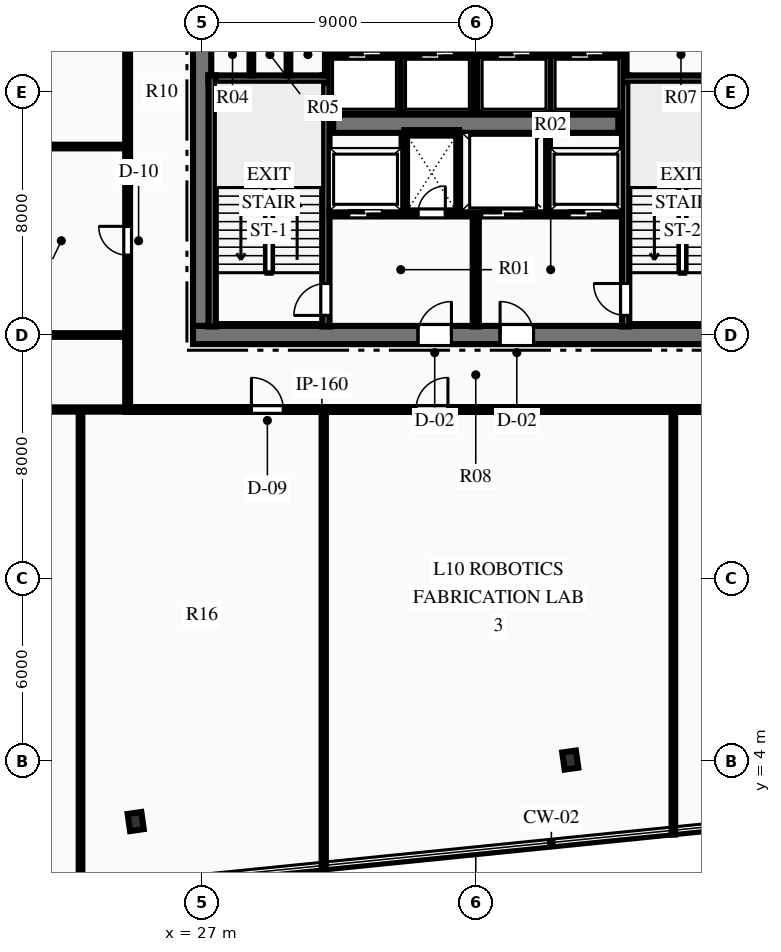
"""IFC4 building model, lengths in metres.
Left out: names, types, materials, properties, quantities, classifications, styles, units other than length and angle.
Written with IfcOpenShell. Run it as: python <this file> out.ifc"""

import sys

from ifc_helpers import new_model, si_unit, direction, frame, frame_2d, origin, origin_2d, place, context, subcontext, project, spatial, rectangle, i_section, extrude, element, fill, save


model = new_model("IFC4")
c1 = context("Model", 3, precision=1e-05, world=origin(), true_north=direction((0.0, 1.0)))
c2 = subcontext(c1, "Body", "Model", "MODEL_VIEW")
j1 = project(units=[si_unit("LENGTHUNIT", "METRE"), si_unit("PLANEANGLEUNIT", "RADIAN")], contexts=[c1])
p1 = place(None, origin())
s1 = spatial("IfcSite", under=j1, at=p1, CompositionType="ELEMENT")
p2 = place(p1, origin())
s2 = spatial("IfcBuilding", under=s1, at=p2, CompositionType="ELEMENT")
p3 = place(p2, frame((0.0, 0.0, 47.7)))
s3 = spatial("IfcBuildingStorey", under=s2, at=p3, CompositionType="ELEMENT", Elevation=47.7)
p4 = place(p3, frame((26.7, 18.0, 0.0), z_axis=(0.0, 0.0, 1.0), x_axis=(1.0, 0.0, 0.0)))
e1 = element("IfcWall", 1, at=p4, inside=s3, PredefinedType="SHEAR", context=c2, shape_type="SweptSolid", body=[
    extrude(rectangle(XDim=18.6, YDim=0.6, at=frame_2d((9.3, 0.0))), origin(), (0.0, 0.0, 1.0), 3.75),
])
p5 = place(p4, frame((7.4, 0.0, 0.0)))
e2 = element("IfcOpeningElement", 2, at=p5, cuts=e1, PredefinedType="OPENING", context=c2, shape_type="SweptSolid", body=[
    extrude(rectangle(XDim=1.1, YDim=2.15, at=frame_2d((0.55, 1.075))), frame((0.0, 0.31, 0.0), z_axis=(0.0, -1.0, 0.0), x_axis=(1.0, 0.0, 0.0)), (0.0, 0.0, 1.0), 0.62),
])
p6 = place(p4, frame((10.1, 0.0, 0.0)))
e3 = element("IfcOpeningElement", 3, at=p6, cuts=e1, PredefinedType="OPENING", context=c2, shape_type="SweptSolid", body=[
    extrude(rectangle(XDim=1.1, YDim=2.15, at=frame_2d((0.55, 1.075))), frame((0.0, 0.31, 0.0), z_axis=(0.0, -1.0, 0.0), x_axis=(1.0, 0.0, 0.0)), (0.0, 0.0, 1.0), 0.62),
])
p7 = place(p3, frame((27.0, 18.3, 0.0), z_axis=(0.0, 0.0, 1.0), x_axis=(0.0, 1.0, 0.0)))
e4 = element("IfcWall", 4, at=p7, inside=s3, PredefinedType="SHEAR", context=c2, shape_type="SweptSolid", body=[
    extrude(rectangle(XDim=15.4, YDim=0.6, at=frame_2d((7.7, 0.0))), origin(), (0.0, 0.0, 1.0), 3.75),
])
p8 = place(p7, frame((9.94, 0.0, 0.0)))
e5 = element("IfcOpeningElement", 5, at=p8, cuts=e4, PredefinedType="OPENING", context=c2, shape_type="SweptSolid", body=[
    extrude(rectangle(XDim=1.4, YDim=2.2, at=frame_2d((0.7, 1.1))), frame((0.0, 0.31, 0.0), z_axis=(0.0, -1.0, 0.0), x_axis=(1.0, 0.0, 0.0)), (0.0, 0.0, 1.0), 0.62),
])
p9 = place(p3, frame((31.31, 24.95, 0.0), z_axis=(0.0, 0.0, 1.0), x_axis=(1.0, 0.0, 0.0)))
e6 = element("IfcWall", 6, at=p9, inside=s3, PredefinedType="SHEAR", context=c2, shape_type="SweptSolid", body=[
    extrude(rectangle(XDim=9.38, YDim=0.6, at=frame_2d((4.69, 0.0))), origin(), (0.0, 0.0, 1.0), 3.75),
])
p10 = place(p3, frame((31.07, 18.28, 0.0), z_axis=(0.0, 0.0, 1.0), x_axis=(0.0, 1.0, 0.0)))
e7 = element("IfcWall", 7, at=p10, inside=s3, PredefinedType="SHEAR", context=c2, shape_type="SweptSolid", body=[
    extrude(rectangle(XDim=8.26, YDim=0.24, at=frame_2d((4.13, 0.0))), origin(), (0.0, 0.0, 1.0), 3.75),
])
p11 = place(p10, frame((0.365, 0.0, 0.0)))
e8 = element("IfcOpeningElement", 8, at=p11, cuts=e7, PredefinedType="OPENING", context=c2, shape_type="SweptSolid", body=[
    extrude(rectangle(XDim=1.05, YDim=2.15, at=frame_2d((0.525, 1.075))), frame((0.0, 0.13, 0.0), z_axis=(0.0, -1.0, 0.0), x_axis=(1.0, 0.0, 0.0)), (0.0, 0.0, 1.0), 0.26),
])
p12 = place(p3, frame((27.21, 26.42, 0.0), z_axis=(0.0, 0.0, 1.0), x_axis=(1.0, 0.0, 0.0)))
e9 = element("IfcWall", 9, at=p12, inside=s3, PredefinedType="SHEAR", context=c2, shape_type="SweptSolid", body=[
    extrude(rectangle(XDim=3.98, YDim=0.24, at=frame_2d((1.99, 0.0))), origin(), (0.0, 0.0, 1.0), 3.75),
])
p13 = place(p3, frame((27.33, 18.28, 0.0), z_axis=(0.0, 0.0, 1.0), x_axis=(0.0, 1.0, 0.0)))
e10 = element("IfcWall", 10, at=p13, inside=s3, PredefinedType="SHEAR", context=c2, shape_type="SweptSolid", body=[
    extrude(rectangle(XDim=8.26, YDim=0.24, at=frame_2d((4.13, 0.0))), origin(), (0.0, 0.0, 1.0), 3.75),
])
p14 = place(p3, frame((40.93, 18.28, 0.0), z_axis=(0.0, 0.0, 1.0), x_axis=(0.0, 1.0, 0.0)))
e11 = element("IfcWall", 11, at=p14, inside=s3, PredefinedType="SHEAR", context=c2, shape_type="SweptSolid", body=[
    extrude(rectangle(XDim=8.26, YDim=0.24, at=frame_2d((4.13, 0.0))), origin(), (0.0, 0.0, 1.0), 3.75),
])
p15 = place(p14, frame((0.365, 0.0, 0.0)))
e12 = element("IfcOpeningElement", 12, at=p15, cuts=e11, PredefinedType="OPENING", context=c2, shape_type="SweptSolid", body=[
    extrude(rectangle(XDim=1.05, YDim=2.15, at=frame_2d((0.525, 1.075))), frame((0.0, 0.13, 0.0), z_axis=(0.0, -1.0, 0.0), x_axis=(1.0, 0.0, 0.0)), (0.0, 0.0, 1.0), 0.26),
])
p16 = place(p3, frame((40.81, 26.42, 0.0), z_axis=(0.0, 0.0, 1.0), x_axis=(1.0, 0.0, 0.0)))
e13 = element("IfcWall", 13, at=p16, inside=s3, PredefinedType="SHEAR", context=c2, shape_type="SweptSolid", body=[
    extrude(rectangle(XDim=3.98, YDim=0.24, at=frame_2d((1.99, 0.0))), origin(), (0.0, 0.0, 1.0), 3.75),
])
for number, where, z_axis, x_axis in (
    (14, (24.815, 1.997, 0.0), (0.0, 0.0, 1.0), (0.99, 0.14, 0.0)),
    (15, (39.109, 4.019, 0.0), (0.0, 0.0, 1.0), (0.99, 0.14, 0.0)),
):
    element("IfcColumn", number, at=place(p3, frame(where, z_axis=z_axis, x_axis=x_axis)), inside=s3, PredefinedType="COLUMN", context=c2, shape_type="SweptSolid", body=[
        extrude(i_section(OverallWidth=0.454, OverallDepth=0.569, WebThickness=0.078, FlangeThickness=0.125, at=origin_2d()), origin(), (0.0, 0.0, 1.0), 3.75),
    ])
p17 = place(p3, frame((36.0, 18.28, 0.0), z_axis=(0.0, 0.0, 1.0), x_axis=(0.0, 1.0, 0.0)))
e16 = element("IfcWall", 16, at=p17, inside=s3, PredefinedType="PARTITIONING", context=c2, shape_type="SweptSolid", body=[
    extrude(rectangle(XDim=3.77, YDim=0.2, at=frame_2d((1.885, 0.0))), origin(), (0.0, 0.0, 1.0), 3.44),
])
p18 = place(p3, frame((31.19, 22.0, 0.0), z_axis=(0.0, 0.0, 1.0), x_axis=(1.0, 0.0, 0.0)))
e17 = element("IfcWall", 17, at=p18, inside=s3, PredefinedType="PARTITIONING", context=c2, shape_type="SweptSolid", body=[
    extrude(rectangle(XDim=4.69, YDim=0.2, at=frame_2d((2.345, 0.0))), origin(), (0.0, 0.0, 1.0), 3.44),
])
p19 = place(p18, frame((2.91, 0.0, 0.0)))
e18 = element("IfcOpeningElement", 18, at=p19, cuts=e17, PredefinedType="OPENING", context=c2, shape_type="SweptSolid", body=[
    extrude(rectangle(XDim=0.9, YDim=2.15, at=frame_2d((0.45, 1.075))), frame((0.0, 0.11, 0.0), z_axis=(0.0, -1.0, 0.0), x_axis=(1.0, 0.0, 0.0)), (0.0, 0.0, 1.0), 0.22),
])
p20 = place(p18, frame((0.635, 0.0, 0.0)))
e19 = element("IfcOpeningElement", 19, at=p20, cuts=e17, PredefinedType="OPENING", context=c2, shape_type="SweptSolid", body=[
    extrude(rectangle(XDim=1.1, YDim=2.15, at=frame_2d((0.55, 1.075))), frame((0.0, 0.11, 0.0), z_axis=(0.0, -1.0, 0.0), x_axis=(1.0, 0.0, 0.0)), (0.0, 0.0, 1.0), 0.22),
])
p21 = place(p3, frame((36.12, 22.0, 0.0), z_axis=(0.0, 0.0, 1.0), x_axis=(1.0, 0.0, 0.0)))
e20 = element("IfcWall", 20, at=p21, inside=s3, PredefinedType="PARTITIONING", context=c2, shape_type="SweptSolid", body=[
    extrude(rectangle(XDim=4.69, YDim=0.2, at=frame_2d((2.345, 0.0))), origin(), (0.0, 0.0, 1.0), 3.44),
])
p22 = place(p21, frame((2.955, 0.0, 0.0)))
e21 = element("IfcOpeningElement", 21, at=p22, cuts=e20, PredefinedType="OPENING", context=c2, shape_type="SweptSolid", body=[
    extrude(rectangle(XDim=1.1, YDim=2.15, at=frame_2d((0.55, 1.075))), frame((0.0, 0.11, 0.0), z_axis=(0.0, -1.0, 0.0), x_axis=(1.0, 0.0, 0.0)), (0.0, 0.0, 1.0), 0.22),
])
p23 = place(p21, frame((0.08, 0.0, 0.0)))
e22 = element("IfcOpeningElement", 22, at=p23, cuts=e20, PredefinedType="OPENING", context=c2, shape_type="SweptSolid", body=[
    extrude(rectangle(XDim=1.4, YDim=2.2, at=frame_2d((0.7, 1.1))), frame((0.0, 0.11, 0.0), z_axis=(0.0, -1.0, 0.0), x_axis=(1.0, 0.0, 0.0)), (0.0, 0.0, 1.0), 0.22),
])
for number, where, z_axis, x_axis in (
    (23, (33.65, 22.05, 0.0), (0.0, 0.0, 1.0), (0.0, 1.0, 0.0)),
    (24, (35.45, 22.05, 0.0), (0.0, 0.0, 1.0), (0.0, 1.0, 0.0)),
):
    element("IfcWall", number, at=place(p3, frame(where, z_axis=z_axis, x_axis=x_axis)), inside=s3, PredefinedType="PARTITIONING", context=c2, shape_type="SweptSolid", body=[
        extrude(rectangle(XDim=2.6, YDim=0.18, at=frame_2d((1.3, 0.0))), origin(), (0.0, 0.0, 1.0), 3.44),
    ])
p24 = place(p3, frame((33.65, 24.65, 0.0), z_axis=(0.0, 0.0, 1.0), x_axis=(1.0, 0.0, 0.0)))
e25 = element("IfcWall", 25, at=p24, inside=s3, PredefinedType="PARTITIONING", context=c2, shape_type="SweptSolid", body=[
    extrude(rectangle(XDim=1.8, YDim=0.18, at=frame_2d((0.9, 0.0))), origin(), (0.0, 0.0, 1.0), 3.44),
])
p25 = place(p3, frame((38.35, 22.05, 0.0), z_axis=(0.0, 0.0, 1.0), x_axis=(0.0, 1.0, 0.0)))
e26 = element("IfcWall", 26, at=p25, inside=s3, PredefinedType="PARTITIONING", context=c2, shape_type="SweptSolid", body=[
    extrude(rectangle(XDim=2.6, YDim=0.18, at=frame_2d((1.3, 0.0))), origin(), (0.0, 0.0, 1.0), 3.44),
])
for number, where, z_axis, x_axis in (
    (27, (31.12, 26.54, 0.0), (0.0, 0.0, 1.0), (0.0, 1.0, 0.0)),
    (28, (40.88, 26.54, 0.0), (0.0, 0.0, 1.0), (0.0, 1.0, 0.0)),
):
    element("IfcWall", number, at=place(p3, frame(where, z_axis=z_axis, x_axis=x_axis)), inside=s3, PredefinedType="PARTITIONING", context=c2, shape_type="SweptSolid", body=[
        extrude(rectangle(XDim=1.51, YDim=0.16, at=frame_2d((0.755, 0.0))), origin(), (0.0, 0.0, 1.0), 3.44),
    ])
for number, where, z_axis, x_axis in (
    (29, (28.62, 26.54, 0.0), (0.0, 0.0, 1.0), (0.0, 1.0, 0.0)),
    (30, (29.84, 26.54, 0.0), (0.0, 0.0, 1.0), (0.0, 1.0, 0.0)),
):
    element("IfcWall", number, at=place(p3, frame(where, z_axis=z_axis, x_axis=x_axis)), inside=s3, PredefinedType="PARTITIONING", context=c2, shape_type="SweptSolid", body=[
        extrude(rectangle(XDim=1.44, YDim=0.12, at=frame_2d((0.72, 0.0))), origin(), (0.0, 0.0, 1.0), 3.44),
    ])
p26 = place(p3, frame((31.2, 27.2, 0.0), z_axis=(0.0, 0.0, 1.0), x_axis=(1.0, 0.0, 0.0)))
e31 = element("IfcWall", 31, at=p26, inside=s3, PredefinedType="PARTITIONING", context=c2, shape_type="SweptSolid", body=[
    extrude(rectangle(XDim=9.6, YDim=0.18, at=frame_2d((4.8, 0.0))), origin(), (0.0, 0.0, 1.0), 3.44),
])
p27 = place(p26, frame((0.59, 0.0, 0.0)))
e32 = element("IfcOpeningElement", 32, at=p27, cuts=e31, PredefinedType="OPENING", context=c2, shape_type="SweptSolid", body=[
    extrude(rectangle(XDim=1.1, YDim=2.15, at=frame_2d((0.55, 1.075))), frame((0.0, 0.1, 0.0), z_axis=(0.0, -1.0, 0.0), x_axis=(1.0, 0.0, 0.0)), (0.0, 0.0, 1.0), 0.2),
])
p28 = place(p26, frame((2.99, 0.0, 0.0)))
e33 = element("IfcOpeningElement", 33, at=p28, cuts=e31, PredefinedType="OPENING", context=c2, shape_type="SweptSolid", body=[
    extrude(rectangle(XDim=1.1, YDim=2.15, at=frame_2d((0.55, 1.075))), frame((0.0, 0.1, 0.0), z_axis=(0.0, -1.0, 0.0), x_axis=(1.0, 0.0, 0.0)), (0.0, 0.0, 1.0), 0.2),
])
p29 = place(p26, frame((5.51, 0.0, 0.0)))
e34 = element("IfcOpeningElement", 34, at=p29, cuts=e31, PredefinedType="OPENING", context=c2, shape_type="SweptSolid", body=[
    extrude(rectangle(XDim=1.1, YDim=2.15, at=frame_2d((0.55, 1.075))), frame((0.0, 0.1, 0.0), z_axis=(0.0, -1.0, 0.0), x_axis=(1.0, 0.0, 0.0)), (0.0, 0.0, 1.0), 0.2),
])
p30 = place(p26, frame((7.91, 0.0, 0.0)))
e35 = element("IfcOpeningElement", 35, at=p30, cuts=e31, PredefinedType="OPENING", context=c2, shape_type="SweptSolid", body=[
    extrude(rectangle(XDim=1.1, YDim=2.15, at=frame_2d((0.55, 1.075))), frame((0.0, 0.1, 0.0), z_axis=(0.0, -1.0, 0.0), x_axis=(1.0, 0.0, 0.0)), (0.0, 0.0, 1.0), 0.2),
])
for number, where, z_axis, x_axis in (
    (36, (33.54, 25.3, 0.0), (0.0, 0.0, 1.0), (0.0, 1.0, 0.0)),
    (37, (36.0, 25.3, 0.0), (0.0, 0.0, 1.0), (0.0, 1.0, 0.0)),
    (38, (38.46, 25.3, 0.0), (0.0, 0.0, 1.0), (0.0, 1.0, 0.0)),
):
    element("IfcWall", number, at=place(p3, frame(where, z_axis=z_axis, x_axis=x_axis)), inside=s3, PredefinedType="PARTITIONING", context=c2, shape_type="SweptSolid", body=[
        extrude(rectangle(XDim=1.9, YDim=0.18, at=frame_2d((0.95, 0.0))), origin(), (0.0, 0.0, 1.0), 3.44),
    ])
p31 = place(p3, frame((24.5, 15.55, 0.0), z_axis=(0.0, 0.0, 1.0), x_axis=(1.0, 0.0, 0.0)))
e39 = element("IfcWall", 39, at=p31, inside=s3, PredefinedType="PARTITIONING", context=c2, shape_type="SweptSolid", body=[
    extrude(rectangle(XDim=23.0, YDim=0.16, at=frame_2d((11.5, 0.0))), origin(), (0.0, 0.0, 1.0), 3.44),
])
p32 = place(p31, frame((4.121, 0.0, 0.0)))
e40 = element("IfcOpeningElement", 40, at=p32, cuts=e39, PredefinedType="OPENING", context=c2, shape_type="SweptSolid", body=[
    extrude(rectangle(XDim=1.05, YDim=2.15, at=frame_2d((0.525, 1.075))), frame((0.0, 0.09, 0.0), z_axis=(0.0, -1.0, 0.0), x_axis=(1.0, 0.0, 0.0)), (0.0, 0.0, 1.0), 0.18),
])
p33 = place(p31, frame((9.535, 0.0, 0.0)))
e41 = element("IfcOpeningElement", 41, at=p33, cuts=e39, PredefinedType="OPENING", context=c2, shape_type="SweptSolid", body=[
    extrude(rectangle(XDim=1.05, YDim=2.15, at=frame_2d((0.525, 1.075))), frame((0.0, 0.09, 0.0), z_axis=(0.0, -1.0, 0.0), x_axis=(1.0, 0.0, 0.0)), (0.0, 0.0, 1.0), 0.18),
])
p34 = place(p31, frame((19.809, 0.0, 0.0)))
e42 = element("IfcOpeningElement", 42, at=p34, cuts=e39, PredefinedType="OPENING", context=c2, shape_type="SweptSolid", body=[
    extrude(rectangle(XDim=1.05, YDim=2.15, at=frame_2d((0.525, 1.075))), frame((0.0, 0.09, 0.0), z_axis=(0.0, -1.0, 0.0), x_axis=(1.0, 0.0, 0.0)), (0.0, 0.0, 1.0), 0.18),
])
p35 = place(p3, frame((24.55, 15.55, 0.0), z_axis=(0.0, 0.0, 1.0), x_axis=(0.0, 1.0, 0.0)))
e43 = element("IfcWall", 43, at=p35, inside=s3, PredefinedType="PARTITIONING", context=c2, shape_type="SweptSolid", body=[
    extrude(rectangle(XDim=20.9, YDim=0.16, at=frame_2d((10.45, 0.0))), origin(), (0.0, 0.0, 1.0), 3.44),
])
p36 = place(p35, frame((5.075, 0.0, 0.0)))
e44 = element("IfcOpeningElement", 44, at=p36, cuts=e43, PredefinedType="OPENING", context=c2, shape_type="SweptSolid", body=[
    extrude(rectangle(XDim=0.95, YDim=2.15, at=frame_2d((0.475, 1.075))), frame((0.0, 0.09, 0.0), z_axis=(0.0, -1.0, 0.0), x_axis=(1.0, 0.0, 0.0)), (0.0, 0.0, 1.0), 0.18),
])
p37 = place(p35, frame((15.563, 0.0, 0.0)))
e45 = element("IfcOpeningElement", 45, at=p37, cuts=e43, PredefinedType="OPENING", context=c2, shape_type="SweptSolid", body=[
    extrude(rectangle(XDim=1.05, YDim=2.15, at=frame_2d((0.525, 1.075))), frame((0.0, 0.09, 0.0), z_axis=(0.0, -1.0, 0.0), x_axis=(1.0, 0.0, 0.0)), (0.0, 0.0, 1.0), 0.18),
])
p38 = place(p3, frame((9.956, 15.55, 0.0), z_axis=(0.0, 0.0, 1.0), x_axis=(1.0, 0.0, 0.0)))
e46 = element("IfcWall", 46, at=p38, inside=s3, PredefinedType="PARTITIONING", context=c2, shape_type="SweptSolid", body=[
    extrude(rectangle(XDim=14.594, YDim=0.14, at=frame_2d((7.297, 0.0))), origin(), (0.0, 0.0, 1.0), 3.44),
])
p39 = place(p38, frame((9.016, 0.0, 0.0)))
e47 = element("IfcOpeningElement", 47, at=p39, cuts=e46, PredefinedType="OPENING", context=c2, shape_type="SweptSolid", body=[
    extrude(rectangle(XDim=0.95, YDim=2.15, at=frame_2d((0.475, 1.075))), frame((0.0, 0.08, 0.0), z_axis=(0.0, -1.0, 0.0), x_axis=(1.0, 0.0, 0.0)), (0.0, 0.0, 1.0), 0.16),
])
p40 = place(p3, frame((23.0, -0.395, 0.0), z_axis=(0.0, 0.0, 1.0), x_axis=(0.0, 1.0, 0.0)))
e48 = element("IfcWall", 48, at=p40, inside=s3, PredefinedType="PARTITIONING", context=c2, shape_type="SweptSolid", body=[
    extrude(rectangle(XDim=15.945, YDim=0.12, at=frame_2d((7.973, 0.0))), origin(), (0.0, 0.0, 1.0), 3.44),
])
p41 = place(p3, frame((31.0, 0.41, 0.0), z_axis=(0.0, 0.0, 1.0), x_axis=(0.0, 1.0, 0.0)))
e49 = element("IfcWall", 49, at=p41, inside=s3, PredefinedType="PARTITIONING", context=c2, shape_type="SweptSolid", body=[
    extrude(rectangle(XDim=15.14, YDim=0.14, at=frame_2d((7.57, 0.0))), origin(), (0.0, 0.0, 1.0), 3.44),
])
p42 = place(p3, frame((42.5, 1.568, 0.0), z_axis=(0.0, 0.0, 1.0), x_axis=(0.0, 1.0, 0.0)))
e50 = element("IfcWall", 50, at=p42, inside=s3, PredefinedType="PARTITIONING", context=c2, shape_type="SweptSolid", body=[
    extrude(rectangle(XDim=13.982, YDim=0.12, at=frame_2d((6.991, 0.0))), origin(), (0.0, 0.0, 1.0), 3.44),
])
for number, where, z_axis, x_axis in (
    (51, (20.2, 18.0, 0.0), (0.0, 0.0, 1.0), (1.0, 0.0, 0.0)),
    (52, (20.2, 24.2, 0.0), (0.0, 0.0, 1.0), (1.0, 0.0, 0.0)),
):
    element("IfcWall", number, at=place(p3, frame(where, z_axis=z_axis, x_axis=x_axis)), inside=s3, PredefinedType="PARTITIONING", context=c2, shape_type="SweptSolid", body=[
        extrude(rectangle(XDim=4.35, YDim=0.12, at=frame_2d((2.175, 0.0))), origin(), (0.0, 0.0, 1.0), 3.44),
    ])
p43 = place(p11, origin())
e53 = element("IfcDoor", 53, at=p43, inside=s3, OperationType="SINGLE_SWING_LEFT", PredefinedType="DOOR", context=c2, shape_type="SweptSolid", body=[
    extrude(rectangle(XDim=1.05, YDim=2.15, at=frame_2d((0.525, 1.075))), frame((0.0, 0.025, 0.0), z_axis=(0.0, -1.0, 0.0), x_axis=(1.0, 0.0, 0.0)), (0.0, 0.0, 1.0), 0.05),
])
fill(e8, e53)
p44 = place(p15, origin())
e54 = element("IfcDoor", 54, at=p44, inside=s3, OperationType="SINGLE_SWING_RIGHT", PredefinedType="DOOR", context=c2, shape_type="SweptSolid", body=[
    extrude(rectangle(XDim=1.05, YDim=2.15, at=frame_2d((0.525, 1.075))), frame((0.0, 0.025, 0.0), z_axis=(0.0, -1.0, 0.0), x_axis=(1.0, 0.0, 0.0)), (0.0, 0.0, 1.0), 0.05),
])
fill(e12, e54)
p45 = place(p5, origin())
e55 = element("IfcDoor", 55, at=p45, inside=s3, OperationType="SINGLE_SWING_RIGHT", PredefinedType="DOOR", context=c2, shape_type="SweptSolid", body=[
    extrude(rectangle(XDim=1.1, YDim=2.15, at=frame_2d((0.55, 1.075))), frame((0.0, 0.025, 0.0), z_axis=(0.0, -1.0, 0.0), x_axis=(1.0, 0.0, 0.0)), (0.0, 0.0, 1.0), 0.05),
])
fill(e2, e55)
p46 = place(p6, origin())
e56 = element("IfcDoor", 56, at=p46, inside=s3, OperationType="SINGLE_SWING_LEFT", PredefinedType="DOOR", context=c2, shape_type="SweptSolid", body=[
    extrude(rectangle(XDim=1.1, YDim=2.15, at=frame_2d((0.55, 1.075))), frame((0.0, 0.025, 0.0), z_axis=(0.0, -1.0, 0.0), x_axis=(1.0, 0.0, 0.0)), (0.0, 0.0, 1.0), 0.05),
])
fill(e3, e56)
p47 = place(p19, origin())
e57 = element("IfcDoor", 57, at=p47, inside=s3, OperationType="SINGLE_SWING_RIGHT", PredefinedType="DOOR", context=c2, shape_type="SweptSolid", body=[
    extrude(rectangle(XDim=0.9, YDim=2.15, at=frame_2d((0.45, 1.075))), frame((0.0, 0.025, 0.0), z_axis=(0.0, -1.0, 0.0), x_axis=(1.0, 0.0, 0.0)), (0.0, 0.0, 1.0), 0.05),
])
fill(e18, e57)
p48 = place(p36, origin())
e58 = element("IfcDoor", 58, at=p48, inside=s3, OperationType="SINGLE_SWING_RIGHT", PredefinedType="DOOR", context=c2, shape_type="SweptSolid", body=[
    extrude(rectangle(XDim=0.95, YDim=2.15, at=frame_2d((0.475, 1.075))), frame((0.0, 0.025, 0.0), z_axis=(0.0, -1.0, 0.0), x_axis=(1.0, 0.0, 0.0)), (0.0, 0.0, 1.0), 0.05),
])
fill(e44, e58)
p49 = place(p32, origin())
e59 = element("IfcDoor", 59, at=p49, inside=s3, OperationType="SINGLE_SWING_LEFT", PredefinedType="DOOR", context=c2, shape_type="SweptSolid", body=[
    extrude(rectangle(XDim=1.05, YDim=2.15, at=frame_2d((0.525, 1.075))), frame((0.0, 0.025, 0.0), z_axis=(0.0, -1.0, 0.0), x_axis=(1.0, 0.0, 0.0)), (0.0, 0.0, 1.0), 0.05),
])
fill(e40, e59)
p50 = place(p33, origin())
e60 = element("IfcDoor", 60, at=p50, inside=s3, OperationType="SINGLE_SWING_RIGHT", PredefinedType="DOOR", context=c2, shape_type="SweptSolid", body=[
    extrude(rectangle(XDim=1.05, YDim=2.15, at=frame_2d((0.525, 1.075))), frame((0.0, 0.025, 0.0), z_axis=(0.0, -1.0, 0.0), x_axis=(1.0, 0.0, 0.0)), (0.0, 0.0, 1.0), 0.05),
])
fill(e41, e60)
p51 = place(p27, origin())
e61 = element("IfcDoor", 61, at=p51, inside=s3, OperationType="SLIDING_TO_LEFT", PredefinedType="DOOR", context=c2, shape_type="SweptSolid", body=[
    extrude(rectangle(XDim=1.1, YDim=2.15, at=frame_2d((0.55, 1.075))), frame((0.0, 0.025, 0.0), z_axis=(0.0, -1.0, 0.0), x_axis=(1.0, 0.0, 0.0)), (0.0, 0.0, 1.0), 0.05),
])
fill(e32, e61)
p52 = place(p28, origin())
e62 = element("IfcDoor", 62, at=p52, inside=s3, OperationType="SLIDING_TO_LEFT", PredefinedType="DOOR", context=c2, shape_type="SweptSolid", body=[
    extrude(rectangle(XDim=1.1, YDim=2.15, at=frame_2d((0.55, 1.075))), frame((0.0, 0.025, 0.0), z_axis=(0.0, -1.0, 0.0), x_axis=(1.0, 0.0, 0.0)), (0.0, 0.0, 1.0), 0.05),
])
fill(e33, e62)
p53 = place(p29, origin())
e63 = element("IfcDoor", 63, at=p53, inside=s3, OperationType="SLIDING_TO_LEFT", PredefinedType="DOOR", context=c2, shape_type="SweptSolid", body=[
    extrude(rectangle(XDim=1.1, YDim=2.15, at=frame_2d((0.55, 1.075))), frame((0.0, 0.025, 0.0), z_axis=(0.0, -1.0, 0.0), x_axis=(1.0, 0.0, 0.0)), (0.0, 0.0, 1.0), 0.05),
])
fill(e34, e63)
p54 = place(p30, origin())
e64 = element("IfcDoor", 64, at=p54, inside=s3, OperationType="SLIDING_TO_LEFT", PredefinedType="DOOR", context=c2, shape_type="SweptSolid", body=[
    extrude(rectangle(XDim=1.1, YDim=2.15, at=frame_2d((0.55, 1.075))), frame((0.0, 0.025, 0.0), z_axis=(0.0, -1.0, 0.0), x_axis=(1.0, 0.0, 0.0)), (0.0, 0.0, 1.0), 0.05),
])
fill(e35, e64)
p55 = place(p20, origin())
e65 = element("IfcDoor", 65, at=p55, inside=s3, OperationType="SLIDING_TO_LEFT", PredefinedType="DOOR", context=c2, shape_type="SweptSolid", body=[
    extrude(rectangle(XDim=1.1, YDim=2.15, at=frame_2d((0.55, 1.075))), frame((0.0, 0.025, 0.0), z_axis=(0.0, -1.0, 0.0), x_axis=(1.0, 0.0, 0.0)), (0.0, 0.0, 1.0), 0.05),
])
fill(e19, e65)
p56 = place(p22, origin())
e66 = element("IfcDoor", 66, at=p56, inside=s3, OperationType="SLIDING_TO_LEFT", PredefinedType="DOOR", context=c2, shape_type="SweptSolid", body=[
    extrude(rectangle(XDim=1.1, YDim=2.15, at=frame_2d((0.55, 1.075))), frame((0.0, 0.025, 0.0), z_axis=(0.0, -1.0, 0.0), x_axis=(1.0, 0.0, 0.0)), (0.0, 0.0, 1.0), 0.05),
])
fill(e21, e66)
p57 = place(p23, origin())
e67 = element("IfcDoor", 67, at=p57, inside=s3, OperationType="SLIDING_TO_LEFT", PredefinedType="DOOR", context=c2, shape_type="SweptSolid", body=[
    extrude(rectangle(XDim=1.4, YDim=2.2, at=frame_2d((0.7, 1.1))), frame((0.0, 0.025, 0.0), z_axis=(0.0, -1.0, 0.0), x_axis=(1.0, 0.0, 0.0)), (0.0, 0.0, 1.0), 0.05),
])
fill(e22, e67)
save(model, sys.argv[1])
